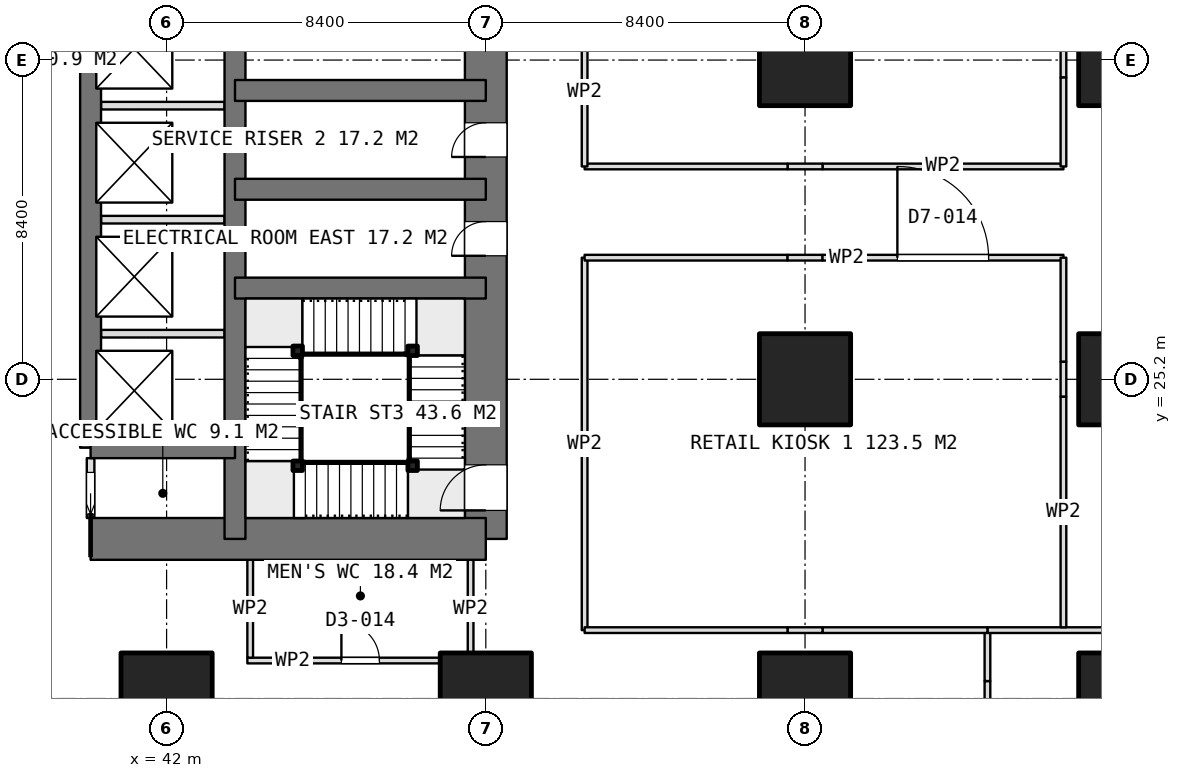
"""IFC4 building model, lengths in metres.
Left out: names, types, materials, properties, quantities, classifications, styles, units other than length and angle.
Written with IfcOpenShell. Run it as: python <this file> out.ifc"""

import sys

from ifc_helpers import new_model, si_unit, direction, frame, frame_2d, origin, origin_2d, place, context, subcontext, project, spatial, rectangle, extrude, element, fill, save


model = new_model("IFC4")
c1 = context("Model", 3, precision=1e-05, world=origin(), true_north=direction((0.0, 1.0)))
c2 = subcontext(c1, "Body", "Model", "MODEL_VIEW")
j1 = project(units=[si_unit("LENGTHUNIT", "METRE"), si_unit("PLANEANGLEUNIT", "RADIAN")], contexts=[c1])
p1 = place(None, origin())
s1 = spatial("IfcSite", under=j1, at=p1, CompositionType="ELEMENT")
p2 = place(p1, origin())
s2 = spatial("IfcBuilding", under=s1, at=p2, CompositionType="ELEMENT")
p3 = place(p2, frame((0.0, 0.0, 5.4)))
s3 = spatial("IfcBuildingStorey", under=s2, at=p3, CompositionType="ELEMENT", Elevation=5.4)
p4 = place(p3, frame((40.0, 21.0, 0.0), z_axis=(0.0, 0.0, 1.0), x_axis=(1.0, 0.0, 0.0)))
e1 = element("IfcWall", 1, at=p4, inside=s3, PredefinedType="SHEAR", context=c2, shape_type="SweptSolid", body=[
    extrude(rectangle(XDim=10.4, YDim=1.1, at=frame_2d((5.2, 0.0))), origin(), (0.0, 0.0, 1.0), 5.0),
])
p5 = place(p3, frame((50.4, 21.0, 0.0), z_axis=(0.0, 0.0, 1.0), x_axis=(0.0, 1.0, 0.0)))
e2 = element("IfcWall", 2, at=p5, inside=s3, PredefinedType="SHEAR", context=c2, shape_type="SweptSolid", body=[
    extrude(rectangle(XDim=25.2, YDim=1.1, at=frame_2d((12.6, 0.0))), origin(), (0.0, 0.0, 1.0), 5.0),
])
p6 = place(p5, frame((16.2, 0.0, 0.0)))
e3 = element("IfcOpeningElement", 3, at=p6, cuts=e2, PredefinedType="OPENING", context=c2, shape_type="SweptSolid", body=[
    extrude(rectangle(XDim=1.2, YDim=2.1, at=frame_2d((0.6, 1.05))), frame((0.0, 0.56, 0.0), z_axis=(0.0, -1.0, 0.0), x_axis=(1.0, 0.0, 0.0)), (0.0, 0.0, 1.0), 1.12),
])
p7 = place(p5, frame((10.05, 0.0, 0.0)))
e4 = element("IfcOpeningElement", 4, at=p7, cuts=e2, PredefinedType="OPENING", context=c2, shape_type="SweptSolid", body=[
    extrude(rectangle(XDim=0.9, YDim=2.1, at=frame_2d((0.45, 1.05))), frame((0.0, 0.56, 0.0), z_axis=(0.0, -1.0, 0.0), x_axis=(1.0, 0.0, 0.0)), (0.0, 0.0, 1.0), 1.12),
])
p8 = place(p5, frame((7.45, 0.0, 0.0)))
e5 = element("IfcOpeningElement", 5, at=p8, cuts=e2, PredefinedType="OPENING", context=c2, shape_type="SweptSolid", body=[
    extrude(rectangle(XDim=0.9, YDim=2.1, at=frame_2d((0.45, 1.05))), frame((0.0, 0.56, 0.0), z_axis=(0.0, -1.0, 0.0), x_axis=(1.0, 0.0, 0.0)), (0.0, 0.0, 1.0), 1.12),
])
p9 = place(p5, frame((0.75, 0.0, 0.0)))
e6 = element("IfcOpeningElement", 6, at=p9, cuts=e2, PredefinedType="OPENING", context=c2, shape_type="SweptSolid", body=[
    extrude(rectangle(XDim=1.2, YDim=2.1, at=frame_2d((0.6, 1.05))), frame((0.0, 0.56, 0.0), z_axis=(0.0, -1.0, 0.0), x_axis=(1.0, 0.0, 0.0)), (0.0, 0.0, 1.0), 1.12),
])
p10 = place(p3, frame((43.8, 21.0, 0.0), z_axis=(0.0, 0.0, 1.0), x_axis=(0.0, 1.0, 0.0)))
e7 = element("IfcWall", 7, at=p10, inside=s3, PredefinedType="SHEAR", context=c2, shape_type="SweptSolid", body=[
    extrude(rectangle(XDim=25.2, YDim=0.55, at=frame_2d((12.6, 0.0))), origin(), (0.0, 0.0, 1.0), 5.0),
])
p11 = place(p3, frame((40.0, 23.4, 0.0), z_axis=(0.0, 0.0, 1.0), x_axis=(0.0, 1.0, 0.0)))
e8 = element("IfcWall", 8, at=p11, inside=s3, PredefinedType="SHEAR", context=c2, shape_type="SweptSolid", body=[
    extrude(rectangle(XDim=18.0, YDim=0.55, at=frame_2d((9.0, 0.0))), origin(), (0.0, 0.0, 1.0), 5.0),
])
p12 = place(p3, frame((40.0, 23.4, 0.0), z_axis=(0.0, 0.0, 1.0), x_axis=(1.0, 0.0, 0.0)))
e9 = element("IfcWall", 9, at=p12, inside=s3, PredefinedType="SHEAR", context=c2, shape_type="SweptSolid", body=[
    extrude(rectangle(XDim=3.8, YDim=0.55, at=frame_2d((1.9, 0.0))), origin(), (0.0, 0.0, 1.0), 5.0),
])
for number, where, z_axis, x_axis in (
    (10, (43.8, 27.6, 0.0), (0.0, 0.0, 1.0), (1.0, 0.0, 0.0)),
    (11, (43.8, 30.2, 0.0), (0.0, 0.0, 1.0), (1.0, 0.0, 0.0)),
    (12, (43.8, 32.8, 0.0), (0.0, 0.0, 1.0), (1.0, 0.0, 0.0)),
):
    element("IfcWall", number, at=place(p3, frame(where, z_axis=z_axis, x_axis=x_axis)), inside=s3, PredefinedType="SHEAR", context=c2, shape_type="SweptSolid", body=[
        extrude(rectangle(XDim=6.6, YDim=0.55, at=frame_2d((3.3, 0.0))), origin(), (0.0, 0.0, 1.0), 5.0),
    ])
for number, where, z_axis, x_axis in (
    (13, (42.0, 16.8, 0.0), (0.0, 0.0, 1.0), (1.0, 0.0, 0.0)),
    (14, (50.4, 16.8, 0.0), (0.0, 0.0, 1.0), (1.0, 0.0, 0.0)),
    (15, (58.8, 16.8, 0.0), (0.0, 0.0, 1.0), (1.0, 0.0, 0.0)),
    (16, (58.8, 25.2, 0.0), (0.0, 0.0, 1.0), (1.0, 0.0, 0.0)),
    (17, (58.8, 33.6, 0.0), (0.0, 0.0, 1.0), (1.0, 0.0, 0.0)),
    (18, (67.2, 16.8, 0.0), (0.0, 0.0, 1.0), (1.0, 0.0, 0.0)),
    (19, (67.2, 25.2, 0.0), (0.0, 0.0, 1.0), (1.0, 0.0, 0.0)),
    (20, (67.2, 33.6, 0.0), (0.0, 0.0, 1.0), (1.0, 0.0, 0.0)),
):
    element("IfcColumn", number, at=place(p3, frame(where, z_axis=z_axis, x_axis=x_axis)), inside=s3, PredefinedType="COLUMN", context=c2, shape_type="SweptSolid", body=[
        extrude(rectangle(XDim=2.4, YDim=2.4, at=origin_2d()), origin(), (0.0, 0.0, 1.0), 5.0),
    ])
for number, where, z_axis, x_axis in (
    (21, (40.275, 26.4, 0.0), (0.0, 0.0, 1.0), (1.0, 0.0, 0.0)),
    (22, (40.275, 29.4, 0.0), (0.0, 0.0, 1.0), (1.0, 0.0, 0.0)),
    (23, (40.275, 32.4, 0.0), (0.0, 0.0, 1.0), (1.0, 0.0, 0.0)),
):
    element("IfcWall", number, at=place(p3, frame(where, z_axis=z_axis, x_axis=x_axis)), inside=s3, PredefinedType="PARTITIONING", context=c2, shape_type="SweptSolid", body=[
        extrude(rectangle(XDim=3.25, YDim=0.2, at=frame_2d((1.625, 0.0))), origin(), (0.0, 0.0, 1.0), 4.7),
    ])
p13 = place(p3, frame((40.0, 21.55, 0.0), z_axis=(0.0, 0.0, 1.0), x_axis=(0.0, 1.0, 0.0)))
e24 = element("IfcWall", 24, at=p13, inside=s3, PredefinedType="PARTITIONING", context=c2, shape_type="SweptSolid", body=[
    extrude(rectangle(XDim=1.575, YDim=0.2, at=frame_2d((0.788, 0.0))), origin(), (0.0, 0.0, 1.0), 4.7),
])
p14 = place(p13, frame((0.1, 0.0, 0.0)))
e25 = element("IfcOpeningElement", 25, at=p14, cuts=e24, PredefinedType="OPENING", context=c2, shape_type="SweptSolid", body=[
    extrude(rectangle(XDim=1.1, YDim=2.1, at=frame_2d((0.55, 1.05))), frame((0.0, 0.11, 0.0), z_axis=(0.0, -1.0, 0.0), x_axis=(1.0, 0.0, 0.0)), (0.0, 0.0, 1.0), 0.22),
])
p15 = place(p3, frame((44.125, 17.8, 0.0), z_axis=(0.0, 0.0, 1.0), x_axis=(1.0, 0.0, 0.0)))
e26 = element("IfcWall", 26, at=p15, inside=s3, PredefinedType="PARTITIONING", context=c2, shape_type="SweptSolid", body=[
    extrude(rectangle(XDim=5.95, YDim=0.15, at=frame_2d((2.975, 0.0))), origin(), (0.0, 0.0, 1.0), 4.7),
])
p16 = place(p15, frame((2.475, 0.0, 0.0)))
e27 = element("IfcOpeningElement", 27, at=p16, cuts=e26, PredefinedType="OPENING", context=c2, shape_type="SweptSolid", body=[
    extrude(rectangle(XDim=1.0, YDim=2.1, at=frame_2d((0.5, 1.05))), frame((0.0, 0.085, 0.0), z_axis=(0.0, -1.0, 0.0), x_axis=(1.0, 0.0, 0.0)), (0.0, 0.0, 1.0), 0.17),
])
for number, where, z_axis, x_axis in (
    (28, (44.2, 17.875, 0.0), (0.0, 0.0, 1.0), (0.0, 1.0, 0.0)),
    (29, (50.0, 17.875, 0.0), (0.0, 0.0, 1.0), (0.0, 1.0, 0.0)),
):
    element("IfcWall", number, at=place(p3, frame(where, z_axis=z_axis, x_axis=x_axis)), inside=s3, PredefinedType="PARTITIONING", context=c2, shape_type="SweptSolid", body=[
        extrude(rectangle(XDim=2.575, YDim=0.15, at=frame_2d((1.288, 0.0))), origin(), (0.0, 0.0, 1.0), 4.7),
    ])
p17 = place(p3, frame((63.6, 16.34, 0.0), z_axis=(0.0, 0.0, 1.0), x_axis=(0.0, 1.0, 0.0)))
e30 = element("IfcWall", 30, at=p17, inside=s3, PredefinedType="PARTITIONING", context=c2, shape_type="SweptSolid", body=[
    extrude(rectangle(XDim=0.92, YDim=0.15, at=frame_2d((0.46, 0.0))), origin(), (0.0, 0.0, 1.0), 2.9),
])
p18 = place(p3, frame((63.6, 17.26, 0.0), z_axis=(0.0, 0.0, 1.0), x_axis=(0.0, 1.0, 0.0)))
e31 = element("IfcWall", 31, at=p18, inside=s3, PredefinedType="PARTITIONING", context=c2, shape_type="SweptSolid", body=[
    extrude(rectangle(XDim=1.34, YDim=0.15, at=frame_2d((0.67, 0.0))), origin(), (0.0, 0.0, 1.0), 4.7),
])
p19 = place(p3, frame((63.6, 18.6, 0.0), z_axis=(0.0, 0.0, 1.0), x_axis=(1.0, 0.0, 0.0)))
e32 = element("IfcWall", 32, at=p19, inside=s3, PredefinedType="PARTITIONING", context=c2, shape_type="SweptSolid", body=[
    extrude(rectangle(XDim=3.14, YDim=0.15, at=frame_2d((1.57, 0.0))), origin(), (0.0, 0.0, 1.0), 4.7),
])
p20 = place(p3, frame((53.0, 18.6, 0.0), z_axis=(0.0, 0.0, 1.0), x_axis=(0.0, 1.0, 0.0)))
e33 = element("IfcWall", 33, at=p20, inside=s3, PredefinedType="PARTITIONING", context=c2, shape_type="SweptSolid", body=[
    extrude(rectangle(XDim=9.8, YDim=0.15, at=frame_2d((4.9, 0.0))), origin(), (0.0, 0.0, 1.0), 4.7),
])
p21 = place(p3, frame((53.0, 28.4, 0.0), z_axis=(0.0, 0.0, 1.0), x_axis=(1.0, 0.0, 0.0)))
e34 = element("IfcWall", 34, at=p21, inside=s3, PredefinedType="PARTITIONING", context=c2, shape_type="SweptSolid", body=[
    extrude(rectangle(XDim=5.34, YDim=0.15, at=frame_2d((2.67, 0.0))), origin(), (0.0, 0.0, 1.0), 4.7),
])
p22 = place(p3, frame((58.34, 28.4, 0.0), z_axis=(0.0, 0.0, 1.0), x_axis=(1.0, 0.0, 0.0)))
e35 = element("IfcWall", 35, at=p22, inside=s3, PredefinedType="PARTITIONING", context=c2, shape_type="SweptSolid", body=[
    extrude(rectangle(XDim=0.92, YDim=0.15, at=frame_2d((0.46, 0.0))), origin(), (0.0, 0.0, 1.0), 2.9),
])
p23 = place(p3, frame((59.26, 28.4, 0.0), z_axis=(0.0, 0.0, 1.0), x_axis=(1.0, 0.0, 0.0)))
e36 = element("IfcWall", 36, at=p23, inside=s3, PredefinedType="PARTITIONING", context=c2, shape_type="SweptSolid", body=[
    extrude(rectangle(XDim=6.34, YDim=0.15, at=frame_2d((3.17, 0.0))), origin(), (0.0, 0.0, 1.0), 4.7),
])
p24 = place(p23, frame((1.97, 0.0, 0.0)))
e37 = element("IfcOpeningElement", 37, at=p24, cuts=e36, PredefinedType="OPENING", context=c2, shape_type="SweptSolid", body=[
    extrude(rectangle(XDim=2.4, YDim=2.4, at=frame_2d((1.2, 1.2))), frame((0.0, 0.085, 0.0), z_axis=(0.0, -1.0, 0.0), x_axis=(1.0, 0.0, 0.0)), (0.0, 0.0, 1.0), 0.17),
])
p25 = place(p3, frame((65.6, 28.4, 0.0), z_axis=(0.0, 0.0, 1.0), x_axis=(0.0, -1.0, 0.0)))
e38 = element("IfcWall", 38, at=p25, inside=s3, PredefinedType="PARTITIONING", context=c2, shape_type="SweptSolid", body=[
    extrude(rectangle(XDim=2.74, YDim=0.15, at=frame_2d((1.37, 0.0))), origin(), (0.0, 0.0, 1.0), 4.7),
])
p26 = place(p3, frame((65.6, 25.66, 0.0), z_axis=(0.0, 0.0, 1.0), x_axis=(0.0, -1.0, 0.0)))
e39 = element("IfcWall", 39, at=p26, inside=s3, PredefinedType="PARTITIONING", context=c2, shape_type="SweptSolid", body=[
    extrude(rectangle(XDim=0.92, YDim=0.15, at=frame_2d((0.46, 0.0))), origin(), (0.0, 0.0, 1.0), 2.9),
])
p27 = place(p3, frame((65.6, 24.74, 0.0), z_axis=(0.0, 0.0, 1.0), x_axis=(0.0, -1.0, 0.0)))
e40 = element("IfcWall", 40, at=p27, inside=s3, PredefinedType="PARTITIONING", context=c2, shape_type="SweptSolid", body=[
    extrude(rectangle(XDim=6.065, YDim=0.15, at=frame_2d((3.032, 0.0))), origin(), (0.0, 0.0, 1.0), 4.7),
])
p28 = place(p3, frame((63.6, 18.6, 0.0), z_axis=(0.0, 0.0, 1.0), x_axis=(-1.0, 0.0, 0.0)))
e41 = element("IfcWall", 41, at=p28, inside=s3, PredefinedType="PARTITIONING", context=c2, shape_type="SweptSolid", body=[
    extrude(rectangle(XDim=4.34, YDim=0.15, at=frame_2d((2.17, 0.0))), origin(), (0.0, 0.0, 1.0), 4.7),
])
p29 = place(p3, frame((59.26, 18.6, 0.0), z_axis=(0.0, 0.0, 1.0), x_axis=(-1.0, 0.0, 0.0)))
e42 = element("IfcWall", 42, at=p29, inside=s3, PredefinedType="PARTITIONING", context=c2, shape_type="SweptSolid", body=[
    extrude(rectangle(XDim=0.92, YDim=0.15, at=frame_2d((0.46, 0.0))), origin(), (0.0, 0.0, 1.0), 2.9),
])
p30 = place(p3, frame((58.34, 18.6, 0.0), z_axis=(0.0, 0.0, 1.0), x_axis=(-1.0, 0.0, 0.0)))
e43 = element("IfcWall", 43, at=p30, inside=s3, PredefinedType="PARTITIONING", context=c2, shape_type="SweptSolid", body=[
    extrude(rectangle(XDim=5.34, YDim=0.15, at=frame_2d((2.67, 0.0))), origin(), (0.0, 0.0, 1.0), 4.7),
])
p31 = place(p3, frame((65.6, 30.8, 0.0), z_axis=(0.0, 0.0, 1.0), x_axis=(-1.0, 0.0, 0.0)))
e44 = element("IfcWall", 44, at=p31, inside=s3, PredefinedType="PARTITIONING", context=c2, shape_type="SweptSolid", body=[
    extrude(rectangle(XDim=6.34, YDim=0.15, at=frame_2d((3.17, 0.0))), origin(), (0.0, 0.0, 1.0), 4.7),
])
p32 = place(p3, frame((59.26, 30.8, 0.0), z_axis=(0.0, 0.0, 1.0), x_axis=(-1.0, 0.0, 0.0)))
e45 = element("IfcWall", 45, at=p32, inside=s3, PredefinedType="PARTITIONING", context=c2, shape_type="SweptSolid", body=[
    extrude(rectangle(XDim=0.92, YDim=0.15, at=frame_2d((0.46, 0.0))), origin(), (0.0, 0.0, 1.0), 2.9),
])
p33 = place(p3, frame((58.34, 30.8, 0.0), z_axis=(0.0, 0.0, 1.0), x_axis=(-1.0, 0.0, 0.0)))
e46 = element("IfcWall", 46, at=p33, inside=s3, PredefinedType="PARTITIONING", context=c2, shape_type="SweptSolid", body=[
    extrude(rectangle(XDim=5.34, YDim=0.15, at=frame_2d((2.67, 0.0))), origin(), (0.0, 0.0, 1.0), 4.7),
])
p34 = place(p3, frame((53.0, 30.8, 0.0), z_axis=(0.0, 0.0, 1.0), x_axis=(0.0, 1.0, 0.0)))
e47 = element("IfcWall", 47, at=p34, inside=s3, PredefinedType="PARTITIONING", context=c2, shape_type="SweptSolid", body=[
    extrude(rectangle(XDim=9.8, YDim=0.15, at=frame_2d((4.9, 0.0))), origin(), (0.0, 0.0, 1.0), 4.7),
])
p35 = place(p34, frame((3.7, 0.0, 0.0)))
e48 = element("IfcOpeningElement", 48, at=p35, cuts=e47, PredefinedType="OPENING", context=c2, shape_type="SweptSolid", body=[
    extrude(rectangle(XDim=2.4, YDim=2.4, at=frame_2d((1.2, 1.2))), frame((0.0, 0.085, 0.0), z_axis=(0.0, -1.0, 0.0), x_axis=(1.0, 0.0, 0.0)), (0.0, 0.0, 1.0), 0.17),
])
p36 = place(p3, frame((65.6, 34.06, 0.0), z_axis=(0.0, 0.0, 1.0), x_axis=(0.0, -1.0, 0.0)))
e49 = element("IfcWall", 49, at=p36, inside=s3, PredefinedType="PARTITIONING", context=c2, shape_type="SweptSolid", body=[
    extrude(rectangle(XDim=0.92, YDim=0.15, at=frame_2d((0.46, 0.0))), origin(), (0.0, 0.0, 1.0), 2.9),
])
p37 = place(p3, frame((65.6, 33.14, 0.0), z_axis=(0.0, 0.0, 1.0), x_axis=(0.0, -1.0, 0.0)))
e50 = element("IfcWall", 50, at=p37, inside=s3, PredefinedType="PARTITIONING", context=c2, shape_type="SweptSolid", body=[
    extrude(rectangle(XDim=2.34, YDim=0.15, at=frame_2d((1.17, 0.0))), origin(), (0.0, 0.0, 1.0), 4.7),
])
for number, where, z_axis, x_axis in (
    (51, (48.475, 22.925, 0.0), (0.0, 0.0, 1.0), (1.0, 0.0, 0.0)),
    (52, (45.45, 22.925, 0.0), (0.0, 0.0, 1.0), (1.0, 0.0, 0.0)),
    (53, (45.45, 25.95, 0.0), (0.0, 0.0, 1.0), (1.0, 0.0, 0.0)),
    (54, (48.475, 25.95, 0.0), (0.0, 0.0, 1.0), (1.0, 0.0, 0.0)),
):
    element("IfcColumn", number, at=place(p3, frame(where, z_axis=z_axis, x_axis=x_axis)), inside=s3, PredefinedType="COLUMN", context=c2, shape_type="SweptSolid", body=[
        extrude(rectangle(XDim=0.25, YDim=0.25, at=origin_2d()), origin(), (0.0, 0.0, 1.0), 5.0),
    ])
p38 = place(p7, origin())
e55 = element("IfcDoor", 55, at=p38, inside=s3, OperationType="SINGLE_SWING_LEFT", PredefinedType="DOOR", context=c2, shape_type="SweptSolid", body=[
    extrude(rectangle(XDim=0.9, YDim=2.1, at=frame_2d((0.45, 1.05))), frame((0.0, 0.025, 0.0), z_axis=(0.0, -1.0, 0.0), x_axis=(1.0, 0.0, 0.0)), (0.0, 0.0, 1.0), 0.05),
])
fill(e4, e55)
p39 = place(p8, origin())
e56 = element("IfcDoor", 56, at=p39, inside=s3, OperationType="SINGLE_SWING_LEFT", PredefinedType="DOOR", context=c2, shape_type="SweptSolid", body=[
    extrude(rectangle(XDim=0.9, YDim=2.1, at=frame_2d((0.45, 1.05))), frame((0.0, 0.025, 0.0), z_axis=(0.0, -1.0, 0.0), x_axis=(1.0, 0.0, 0.0)), (0.0, 0.0, 1.0), 0.05),
])
fill(e5, e56)
p40 = place(p14, origin())
e57 = element("IfcDoor", 57, at=p40, inside=s3, OperationType="SLIDING_TO_LEFT", PredefinedType="DOOR", context=c2, shape_type="SweptSolid", body=[
    extrude(rectangle(XDim=1.1, YDim=2.1, at=frame_2d((0.55, 1.05))), frame((0.0, 0.025, 0.0), z_axis=(0.0, -1.0, 0.0), x_axis=(1.0, 0.0, 0.0)), (0.0, 0.0, 1.0), 0.05),
])
fill(e25, e57)
p41 = place(p16, origin())
e58 = element("IfcDoor", 58, at=p41, inside=s3, OperationType="SINGLE_SWING_LEFT", PredefinedType="DOOR", context=c2, shape_type="SweptSolid", body=[
    extrude(rectangle(XDim=1.0, YDim=2.1, at=frame_2d((0.5, 1.05))), frame((0.0, 0.025, 0.0), z_axis=(0.0, -1.0, 0.0), x_axis=(1.0, 0.0, 0.0)), (0.0, 0.0, 1.0), 0.05),
])
fill(e27, e58)
p42 = place(p24, origin())
e59 = element("IfcDoor", 59, at=p42, inside=s3, OperationType="DOUBLE_DOOR_SINGLE_SWING", PredefinedType="DOOR", context=c2, shape_type="SweptSolid", body=[
    extrude(rectangle(XDim=2.4, YDim=2.4, at=frame_2d((1.2, 1.2))), frame((0.0, 0.025, 0.0), z_axis=(0.0, -1.0, 0.0), x_axis=(1.0, 0.0, 0.0)), (0.0, 0.0, 1.0), 0.05),
])
fill(e37, e59)
p43 = place(p9, origin())
e60 = element("IfcDoor", 60, at=p43, inside=s3, OperationType="SINGLE_SWING_RIGHT", PredefinedType="DOOR", context=c2, shape_type="SweptSolid", body=[
    extrude(rectangle(XDim=1.2, YDim=2.1, at=frame_2d((0.6, 1.05))), frame((0.0, 0.025, 0.0), z_axis=(0.0, -1.0, 0.0), x_axis=(1.0, 0.0, 0.0)), (0.0, 0.0, 1.0), 0.05),
])
fill(e6, e60)
save(model, sys.argv[1])
